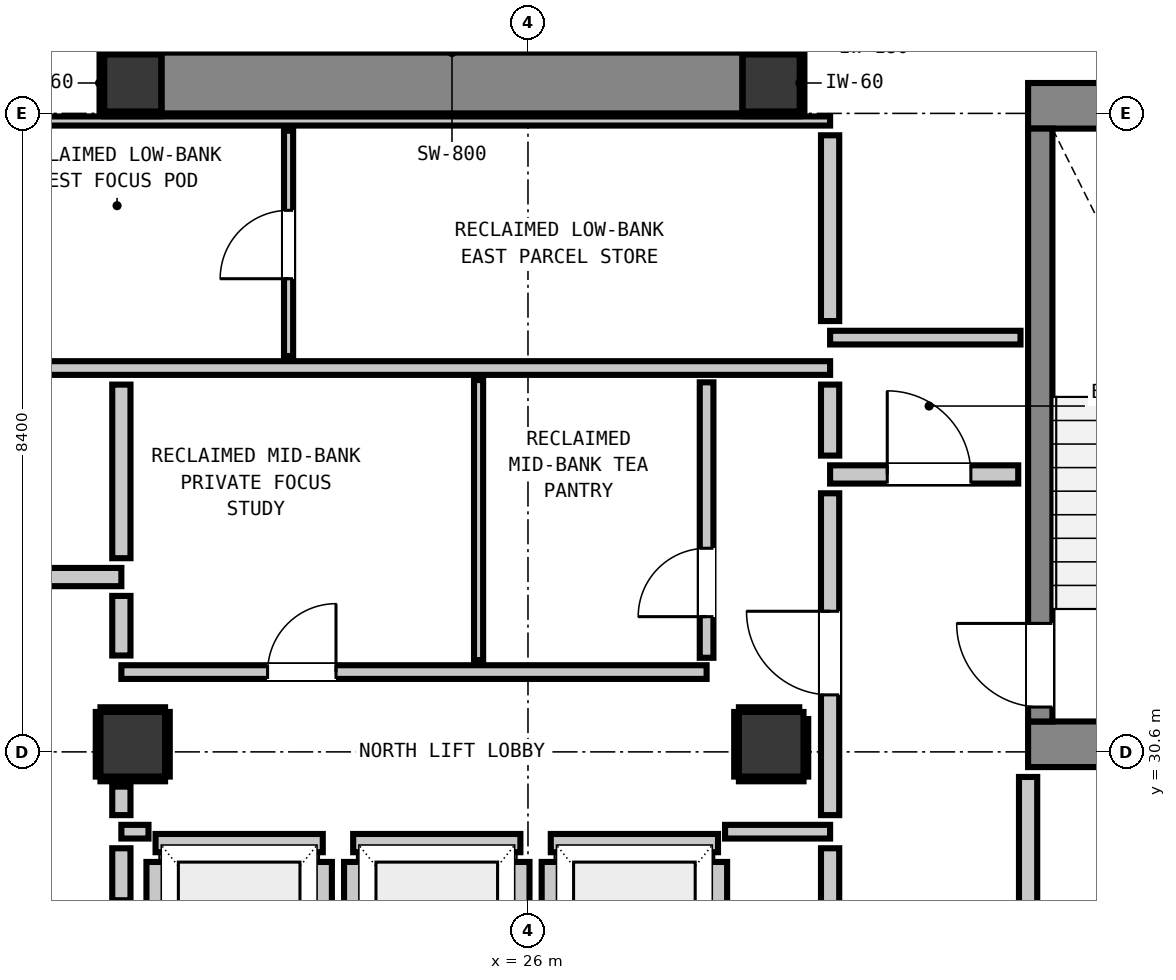
"""IFC4 building model, lengths in metres.
Left out: names, types, materials, properties, quantities, classifications, styles, units other than length and angle.
Written with IfcOpenShell. Run it as: python <this file> out.ifc"""

import sys

from ifc_helpers import new_model, si_unit, direction, frame, frame_2d, origin, origin_2d, place, context, subcontext, project, spatial, rectangle, extrude, element, fill, save


model = new_model("IFC4")
c1 = context("Model", 3, precision=1e-05, world=origin(), true_north=direction((0.0, 1.0)))
c2 = subcontext(c1, "Body", "Model", "MODEL_VIEW")
j1 = project(units=[si_unit("LENGTHUNIT", "METRE"), si_unit("PLANEANGLEUNIT", "RADIAN")], contexts=[c1])
p1 = place(None, origin())
s1 = spatial("IfcSite", under=j1, at=p1, CompositionType="ELEMENT")
p2 = place(p1, origin())
s2 = spatial("IfcBuilding", under=s1, at=p2, CompositionType="ELEMENT")
p3 = place(p2, frame((0.0, 0.0, 241.24)))
s3 = spatial("IfcBuildingStorey", under=s2, at=p3, CompositionType="ELEMENT", Elevation=241.24)
for number, where, z_axis, x_axis in (
    (1, (20.8, 39.4, 0.0), (0.0, 0.0, 1.0), (1.0, 0.0, 0.0)),
    (2, (29.2, 39.4, 0.0), (0.0, 0.0, 1.0), (1.0, 0.0, 0.0)),
):
    element("IfcColumn", number, at=place(p3, frame(where, z_axis=z_axis, x_axis=x_axis)), inside=s3, PredefinedType="COLUMN", context=c2, shape_type="SweptSolid", body=[
        extrude(rectangle(XDim=0.75, YDim=0.75, at=origin_2d()), origin(), (0.0, 0.0, 1.0), 3.32),
    ])
p4 = place(p3, frame((32.58, 39.1, 0.0), z_axis=(0.0, 0.0, 1.0), x_axis=(1.0, 0.0, 0.0)))
e3 = element("IfcWall", 3, at=p4, inside=s3, PredefinedType="SHEAR", context=c2, shape_type="SweptSolid", body=[
    extrude(rectangle(XDim=4.08, YDim=0.6, at=frame_2d((2.04, 0.0))), origin(), (0.0, 0.0, 1.0), 3.32),
])
p5 = place(p3, frame((32.58, 30.7, 0.0), z_axis=(0.0, 0.0, 1.0), x_axis=(1.0, 0.0, 0.0)))
e4 = element("IfcWall", 4, at=p5, inside=s3, PredefinedType="SHEAR", context=c2, shape_type="SweptSolid", body=[
    extrude(rectangle(XDim=3.54, YDim=0.6, at=frame_2d((1.77, 0.0))), origin(), (0.0, 0.0, 1.0), 3.32),
])
p6 = place(p3, frame((21.18, 39.4, 0.0), z_axis=(0.0, 0.0, 1.0), x_axis=(1.0, 0.0, 0.0)))
e5 = element("IfcWall", 5, at=p6, inside=s3, PredefinedType="SHEAR", context=c2, shape_type="SweptSolid", body=[
    extrude(rectangle(XDim=7.64, YDim=0.8, at=frame_2d((3.82, 0.0))), origin(), (0.0, 0.0, 1.0), 3.32),
])
p7 = place(p3, frame((32.74, 31.0, 0.0), z_axis=(0.0, 0.0, 1.0), x_axis=(0.0, 1.0, 0.0)))
e6 = element("IfcWall", 6, at=p7, inside=s3, PredefinedType="SHEAR", context=c2, shape_type="SweptSolid", body=[
    extrude(rectangle(XDim=7.8, YDim=0.32, at=frame_2d((3.9, 0.0))), origin(), (0.0, 0.0, 1.0), 3.32),
])
p8 = place(p7, frame((0.19, 0.0, 0.0)))
e7 = element("IfcOpeningElement", 7, at=p8, cuts=e6, PredefinedType="OPENING", context=c2, shape_type="SweptSolid", body=[
    extrude(rectangle(XDim=1.1, YDim=2.15, at=frame_2d((0.55, 1.075))), frame((0.0, 0.17, 0.0), z_axis=(0.0, -1.0, 0.0), x_axis=(1.0, 0.0, 0.0)), (0.0, 0.0, 1.0), 0.34),
])
for number, where, z_axis, x_axis in (
    (8, (20.8, 30.7, 0.0), (0.0, 0.0, 1.0), (1.0, 0.0, 0.0)),
    (9, (29.2, 30.7, 0.0), (0.0, 0.0, 1.0), (1.0, 0.0, 0.0)),
):
    element("IfcColumn", number, at=place(p3, frame(where, z_axis=z_axis, x_axis=x_axis)), inside=s3, PredefinedType="COLUMN", context=c2, shape_type="SweptSolid", body=[
        extrude(rectangle(XDim=0.85, YDim=0.85, at=origin_2d()), origin(), (0.0, 0.0, 1.0), 3.32),
    ])
p9 = place(p3, frame((21.1, 29.4, 0.0), z_axis=(0.0, 0.0, 1.0), x_axis=(1.0, 0.0, 0.0)))
e10 = element("IfcWall", 10, at=p9, inside=s3, PredefinedType="PARTITIONING", context=c2, shape_type="SweptSolid", body=[
    extrude(rectangle(XDim=2.2, YDim=0.24, at=frame_2d((1.1, 0.0))), origin(), (0.0, 0.0, 1.0), 3.1),
])
p10 = place(p3, frame((21.1, 27.048, 0.0), z_axis=(0.0, 0.0, 1.0), x_axis=(0.0, 1.0, 0.0)))
e11 = element("IfcWall", 11, at=p10, inside=s3, PredefinedType="PARTITIONING", context=c2, shape_type="SweptSolid", body=[
    extrude(rectangle(XDim=2.104, YDim=0.24, at=frame_2d((1.052, 0.0))), origin(), (0.0, 0.0, 1.0), 2.335),
])
p11 = place(p3, frame((23.3, 27.048, 0.0), z_axis=(0.0, 0.0, 1.0), x_axis=(0.0, 1.0, 0.0)))
e12 = element("IfcWall", 12, at=p11, inside=s3, PredefinedType="PARTITIONING", context=c2, shape_type="SweptSolid", body=[
    extrude(rectangle(XDim=2.104, YDim=0.24, at=frame_2d((1.052, 0.0))), origin(), (0.0, 0.0, 1.0), 3.1),
])
p12 = place(p3, frame((23.7, 29.4, 0.0), z_axis=(0.0, 0.0, 1.0), x_axis=(1.0, 0.0, 0.0)))
e13 = element("IfcWall", 13, at=p12, inside=s3, PredefinedType="PARTITIONING", context=c2, shape_type="SweptSolid", body=[
    extrude(rectangle(XDim=2.2, YDim=0.24, at=frame_2d((1.1, 0.0))), origin(), (0.0, 0.0, 1.0), 3.1),
])
for number, where, z_axis, x_axis in (
    (14, (23.7, 27.048, 0.0), (0.0, 0.0, 1.0), (0.0, 1.0, 0.0)),
    (15, (25.9, 27.048, 0.0), (0.0, 0.0, 1.0), (0.0, 1.0, 0.0)),
):
    element("IfcWall", number, at=place(p3, frame(where, z_axis=z_axis, x_axis=x_axis)), inside=s3, PredefinedType="PARTITIONING", context=c2, shape_type="SweptSolid", body=[
        extrude(rectangle(XDim=2.104, YDim=0.24, at=frame_2d((1.052, 0.0))), origin(), (0.0, 0.0, 1.0), 3.1),
    ])
p13 = place(p3, frame((26.3, 29.4, 0.0), z_axis=(0.0, 0.0, 1.0), x_axis=(1.0, 0.0, 0.0)))
e16 = element("IfcWall", 16, at=p13, inside=s3, PredefinedType="PARTITIONING", context=c2, shape_type="SweptSolid", body=[
    extrude(rectangle(XDim=2.2, YDim=0.24, at=frame_2d((1.1, 0.0))), origin(), (0.0, 0.0, 1.0), 3.1),
])
p14 = place(p3, frame((26.3, 27.048, 0.0), z_axis=(0.0, 0.0, 1.0), x_axis=(0.0, 1.0, 0.0)))
e17 = element("IfcWall", 17, at=p14, inside=s3, PredefinedType="PARTITIONING", context=c2, shape_type="SweptSolid", body=[
    extrude(rectangle(XDim=2.104, YDim=0.24, at=frame_2d((1.052, 0.0))), origin(), (0.0, 0.0, 1.0), 3.1),
])
p15 = place(p3, frame((28.5, 27.33, 0.0), z_axis=(0.0, 0.0, 1.0), x_axis=(0.0, 1.0, 0.0)))
e18 = element("IfcWall", 18, at=p15, inside=s3, PredefinedType="PARTITIONING", context=c2, shape_type="SweptSolid", body=[
    extrude(rectangle(XDim=1.822, YDim=0.24, at=frame_2d((0.911, 0.0))), origin(), (0.0, 0.0, 1.0), 3.1),
])
p16 = place(p3, frame((17.45, 32.9, 0.0), z_axis=(0.0, 0.0, 1.0), x_axis=(1.0, 0.0, 0.0)))
e19 = element("IfcWall", 19, at=p16, inside=s3, PredefinedType="PARTITIONING", context=c2, shape_type="SweptSolid", body=[
    extrude(rectangle(XDim=3.2, YDim=0.24, at=frame_2d((1.6, 0.0))), origin(), (0.0, 0.0, 1.0), 3.1),
])
p17 = place(p16, frame((0.159, 0.0, 0.0)))
e20 = element("IfcOpeningElement", 20, at=p17, cuts=e19, PredefinedType="OPENING", context=c2, shape_type="SweptSolid", body=[
    extrude(rectangle(XDim=1.1, YDim=2.15, at=frame_2d((0.55, 1.075))), frame((0.0, 0.13, 0.0), z_axis=(0.0, -1.0, 0.0), x_axis=(1.0, 0.0, 0.0)), (0.0, 0.0, 1.0), 0.26),
])
p18 = place(p3, frame((29.975, 34.25, 0.0), z_axis=(0.0, 0.0, 1.0), x_axis=(1.0, 0.0, 0.0)))
e21 = element("IfcWall", 21, at=p18, inside=s3, PredefinedType="PARTITIONING", context=c2, shape_type="SweptSolid", body=[
    extrude(rectangle(XDim=2.475, YDim=0.24, at=frame_2d((1.237, 0.0))), origin(), (0.0, 0.0, 1.0), 3.1),
])
p19 = place(p18, frame((0.752, 0.0, 0.0)))
e22 = element("IfcOpeningElement", 22, at=p19, cuts=e21, PredefinedType="OPENING", context=c2, shape_type="SweptSolid", body=[
    extrude(rectangle(XDim=1.1, YDim=2.15, at=frame_2d((0.55, 1.075))), frame((0.0, 0.13, 0.0), z_axis=(0.0, -1.0, 0.0), x_axis=(1.0, 0.0, 0.0)), (0.0, 0.0, 1.0), 0.26),
])
p20 = place(p3, frame((20.65, 29.55, 0.0), z_axis=(0.0, 0.0, 1.0), x_axis=(1.0, 0.0, 0.0)))
e23 = element("IfcWall", 23, at=p20, inside=s3, PredefinedType="PARTITIONING", context=c2, shape_type="SweptSolid", body=[
    extrude(rectangle(XDim=0.357, YDim=0.18, at=frame_2d((0.179, 0.0))), origin(), (0.0, 0.0, 1.0), 3.1),
])
p21 = place(p3, frame((28.593, 29.55, 0.0), z_axis=(0.0, 0.0, 1.0), x_axis=(1.0, 0.0, 0.0)))
e24 = element("IfcWall", 24, at=p21, inside=s3, PredefinedType="PARTITIONING", context=c2, shape_type="SweptSolid", body=[
    extrude(rectangle(XDim=1.382, YDim=0.18, at=frame_2d((0.691, 0.0))), origin(), (0.0, 0.0, 1.0), 3.1),
])
p22 = place(p3, frame((20.65, 31.65, 0.0), z_axis=(0.0, 0.0, 1.0), x_axis=(1.0, 0.0, 0.0)))
e25 = element("IfcWall", 25, at=p22, inside=s3, PredefinedType="PARTITIONING", context=c2, shape_type="SweptSolid", body=[
    extrude(rectangle(XDim=7.7, YDim=0.18, at=frame_2d((3.85, 0.0))), origin(), (0.0, 0.0, 1.0), 3.1),
])
p23 = place(p22, frame((1.924, 0.0, 0.0)))
e26 = element("IfcOpeningElement", 26, at=p23, cuts=e25, PredefinedType="OPENING", context=c2, shape_type="SweptSolid", body=[
    extrude(rectangle(XDim=0.9, YDim=2.1, at=frame_2d((0.45, 1.05))), frame((0.0, 0.1, 0.0), z_axis=(0.0, -1.0, 0.0), x_axis=(1.0, 0.0, 0.0)), (0.0, 0.0, 1.0), 0.2),
])
p24 = place(p3, frame((18.95, 35.65, 0.0), z_axis=(0.0, 0.0, 1.0), x_axis=(1.0, 0.0, 0.0)))
e27 = element("IfcWall", 27, at=p24, inside=s3, PredefinedType="PARTITIONING", context=c2, shape_type="SweptSolid", body=[
    extrude(rectangle(XDim=11.025, YDim=0.18, at=frame_2d((5.513, 0.0))), origin(), (0.0, 0.0, 1.0), 3.1),
])
p25 = place(p3, frame((29.975, 36.05, 0.0), z_axis=(0.0, 0.0, 1.0), x_axis=(1.0, 0.0, 0.0)))
e28 = element("IfcWall", 28, at=p25, inside=s3, PredefinedType="PARTITIONING", context=c2, shape_type="SweptSolid", body=[
    extrude(rectangle(XDim=2.505, YDim=0.18, at=frame_2d((1.252, 0.0))), origin(), (0.0, 0.0, 1.0), 3.1),
])
p26 = place(p3, frame((18.95, 38.9, 0.0), z_axis=(0.0, 0.0, 1.0), x_axis=(1.0, 0.0, 0.0)))
e29 = element("IfcWall", 29, at=p26, inside=s3, PredefinedType="PARTITIONING", context=c2, shape_type="SweptSolid", body=[
    extrude(rectangle(XDim=11.025, YDim=0.12, at=frame_2d((5.513, 0.0))), origin(), (0.0, 0.0, 1.0), 3.1),
])
p27 = place(p3, frame((20.65, 28.648, 0.0), z_axis=(0.0, 0.0, 1.0), x_axis=(0.0, 1.0, 0.0)))
e30 = element("IfcWall", 30, at=p27, inside=s3, PredefinedType="PARTITIONING", context=c2, shape_type="SweptSolid", body=[
    extrude(rectangle(XDim=0.684, YDim=0.24, at=frame_2d((0.342, 0.0))), origin(), (0.0, 0.0, 1.0), 2.335),
])
p28 = place(p3, frame((20.65, 29.768, 0.0), z_axis=(0.0, 0.0, 1.0), x_axis=(0.0, 1.0, 0.0)))
e31 = element("IfcWall", 31, at=p28, inside=s3, PredefinedType="PARTITIONING", context=c2, shape_type="SweptSolid", body=[
    extrude(rectangle(XDim=0.375, YDim=0.24, at=frame_2d((0.188, 0.0))), origin(), (0.0, 0.0, 1.0), 2.335),
])
p29 = place(p3, frame((20.65, 31.868, 0.0), z_axis=(0.0, 0.0, 1.0), x_axis=(0.0, 1.0, 0.0)))
e32 = element("IfcWall", 32, at=p29, inside=s3, PredefinedType="PARTITIONING", context=c2, shape_type="SweptSolid", body=[
    extrude(rectangle(XDim=0.784, YDim=0.24, at=frame_2d((0.392, 0.0))), origin(), (0.0, 0.0, 1.0), 2.335),
])
p30 = place(p3, frame((20.65, 33.148, 0.0), z_axis=(0.0, 0.0, 1.0), x_axis=(0.0, 1.0, 0.0)))
e33 = element("IfcWall", 33, at=p30, inside=s3, PredefinedType="PARTITIONING", context=c2, shape_type="SweptSolid", body=[
    extrude(rectangle(XDim=2.284, YDim=0.24, at=frame_2d((1.142, 0.0))), origin(), (0.0, 0.0, 1.0), 2.335),
])
p31 = place(p3, frame((29.975, 25.648, 0.0), z_axis=(0.0, 0.0, 1.0), x_axis=(0.0, 1.0, 0.0)))
e34 = element("IfcWall", 34, at=p31, inside=s3, PredefinedType="PARTITIONING", context=c2, shape_type="SweptSolid", body=[
    extrude(rectangle(XDim=3.684, YDim=0.24, at=frame_2d((1.842, 0.0))), origin(), (0.0, 0.0, 1.0), 3.1),
])
p32 = place(p3, frame((29.975, 29.768, 0.0), z_axis=(0.0, 0.0, 1.0), x_axis=(0.0, 1.0, 0.0)))
e35 = element("IfcWall", 35, at=p32, inside=s3, PredefinedType="PARTITIONING", context=c2, shape_type="SweptSolid", body=[
    extrude(rectangle(XDim=4.234, YDim=0.24, at=frame_2d((2.117, 0.0))), origin(), (0.0, 0.0, 1.0), 3.1),
])
p33 = place(p32, frame((1.582, 0.0, 0.0)))
e36 = element("IfcOpeningElement", 36, at=p33, cuts=e35, PredefinedType="OPENING", context=c2, shape_type="SweptSolid", body=[
    extrude(rectangle(XDim=1.1, YDim=2.15, at=frame_2d((0.55, 1.075))), frame((0.0, 0.13, 0.0), z_axis=(0.0, -1.0, 0.0), x_axis=(1.0, 0.0, 0.0)), (0.0, 0.0, 1.0), 0.26),
])
p34 = place(p3, frame((29.975, 34.498, 0.0), z_axis=(0.0, 0.0, 1.0), x_axis=(0.0, 1.0, 0.0)))
e37 = element("IfcWall", 37, at=p34, inside=s3, PredefinedType="PARTITIONING", context=c2, shape_type="SweptSolid", body=[
    extrude(rectangle(XDim=0.934, YDim=0.24, at=frame_2d((0.467, 0.0))), origin(), (0.0, 0.0, 1.0), 3.1),
])
p35 = place(p3, frame((29.975, 36.268, 0.0), z_axis=(0.0, 0.0, 1.0), x_axis=(0.0, 1.0, 0.0)))
e38 = element("IfcWall", 38, at=p35, inside=s3, PredefinedType="PARTITIONING", context=c2, shape_type="SweptSolid", body=[
    extrude(rectangle(XDim=2.444, YDim=0.24, at=frame_2d((1.222, 0.0))), origin(), (0.0, 0.0, 1.0), 3.1),
])
p36 = place(p3, frame((32.58, 25.648, 0.0), z_axis=(0.0, 0.0, 1.0), x_axis=(0.0, 1.0, 0.0)))
e39 = element("IfcWall", 39, at=p36, inside=s3, PredefinedType="PARTITIONING", context=c2, shape_type="SweptSolid", body=[
    extrude(rectangle(XDim=4.622, YDim=0.24, at=frame_2d((2.311, 0.0))), origin(), (0.0, 0.0, 1.0), 3.1),
])
p37 = place(p3, frame((28.35, 31.838, 0.0), z_axis=(0.0, 0.0, 1.0), x_axis=(0.0, 1.0, 0.0)))
e40 = element("IfcWall", 40, at=p37, inside=s3, PredefinedType="PARTITIONING", context=c2, shape_type="SweptSolid", body=[
    extrude(rectangle(XDim=3.624, YDim=0.18, at=frame_2d((1.812, 0.0))), origin(), (0.0, 0.0, 1.0), 3.1),
])
p38 = place(p37, frame((0.541, 0.0, 0.0)))
e41 = element("IfcOpeningElement", 41, at=p38, cuts=e40, PredefinedType="OPENING", context=c2, shape_type="SweptSolid", body=[
    extrude(rectangle(XDim=0.9, YDim=2.1, at=frame_2d((0.45, 1.05))), frame((0.0, 0.1, 0.0), z_axis=(0.0, -1.0, 0.0), x_axis=(1.0, 0.0, 0.0)), (0.0, 0.0, 1.0), 0.2),
])
p39 = place(p3, frame((22.85, 35.808, 0.0), z_axis=(0.0, 0.0, 1.0), x_axis=(0.0, 1.0, 0.0)))
e42 = element("IfcWall", 42, at=p39, inside=s3, PredefinedType="PARTITIONING", context=c2, shape_type="SweptSolid", body=[
    extrude(rectangle(XDim=2.964, YDim=0.12, at=frame_2d((1.482, 0.0))), origin(), (0.0, 0.0, 1.0), 3.1),
])
p40 = place(p39, frame((1.017, 0.0, 0.0)))
e43 = element("IfcOpeningElement", 43, at=p40, cuts=e42, PredefinedType="OPENING", context=c2, shape_type="SweptSolid", body=[
    extrude(rectangle(XDim=0.9, YDim=2.1, at=frame_2d((0.45, 1.05))), frame((0.0, 0.07, 0.0), z_axis=(0.0, -1.0, 0.0), x_axis=(1.0, 0.0, 0.0)), (0.0, 0.0, 1.0), 0.14),
])
p41 = place(p3, frame((25.35, 31.808, 0.0), z_axis=(0.0, 0.0, 1.0), x_axis=(0.0, 1.0, 0.0)))
e44 = element("IfcWall", 44, at=p41, inside=s3, PredefinedType="PARTITIONING", context=c2, shape_type="SweptSolid", body=[
    extrude(rectangle(XDim=3.684, YDim=0.12, at=frame_2d((1.842, 0.0))), origin(), (0.0, 0.0, 1.0), 3.1),
])
for number, where, z_axis, x_axis in (
    (45, (20.425, 38.993, 0.0), (0.0, 0.0, 1.0), (1.0, 0.0, 0.0)),
    (46, (20.425, 39.807, 0.0), (0.0, 0.0, 1.0), (1.0, 0.0, 0.0)),
):
    element("IfcWall", number, at=place(p3, frame(where, z_axis=z_axis, x_axis=x_axis)), inside=s3, PredefinedType="PARTITIONING", context=c2, shape_type="SweptSolid", body=[
        extrude(rectangle(XDim=0.742, YDim=0.06, at=frame_2d((0.371, 0.0))), origin(), (0.0, 0.0, 1.0), 1.45),
    ])
p42 = place(p3, frame((20.393, 39.025, 0.0), z_axis=(0.0, 0.0, 1.0), x_axis=(0.0, 1.0, 0.0)))
e47 = element("IfcWall", 47, at=p42, inside=s3, PredefinedType="PARTITIONING", context=c2, shape_type="SweptSolid", body=[
    extrude(rectangle(XDim=0.75, YDim=0.06, at=frame_2d((0.375, 0.0))), origin(), (0.0, 0.0, 1.0), 1.45),
])
for number, where, z_axis, x_axis in (
    (48, (28.833, 38.993, 0.0), (0.0, 0.0, 1.0), (1.0, 0.0, 0.0)),
    (49, (28.833, 39.807, 0.0), (0.0, 0.0, 1.0), (1.0, 0.0, 0.0)),
):
    element("IfcWall", number, at=place(p3, frame(where, z_axis=z_axis, x_axis=x_axis)), inside=s3, PredefinedType="PARTITIONING", context=c2, shape_type="SweptSolid", body=[
        extrude(rectangle(XDim=0.742, YDim=0.06, at=frame_2d((0.371, 0.0))), origin(), (0.0, 0.0, 1.0), 1.45),
    ])
p43 = place(p3, frame((29.607, 39.025, 0.0), z_axis=(0.0, 0.0, 1.0), x_axis=(0.0, 1.0, 0.0)))
e50 = element("IfcWall", 50, at=p43, inside=s3, PredefinedType="PARTITIONING", context=c2, shape_type="SweptSolid", body=[
    extrude(rectangle(XDim=0.75, YDim=0.06, at=frame_2d((0.375, 0.0))), origin(), (0.0, 0.0, 1.0), 1.45),
])
for number, where, z_axis, x_axis in (
    (51, (20.375, 30.243, 0.0), (0.0, 0.0, 1.0), (1.0, 0.0, 0.0)),
    (52, (20.375, 31.157, 0.0), (0.0, 0.0, 1.0), (1.0, 0.0, 0.0)),
    (53, (20.343, 30.275, 0.0), (0.0, 0.0, 1.0), (0.0, 1.0, 0.0)),
    (54, (21.257, 30.275, 0.0), (0.0, 0.0, 1.0), (0.0, 1.0, 0.0)),
    (55, (28.775, 30.243, 0.0), (0.0, 0.0, 1.0), (1.0, 0.0, 0.0)),
):
    element("IfcWall", number, at=place(p3, frame(where, z_axis=z_axis, x_axis=x_axis)), inside=s3, PredefinedType="PARTITIONING", context=c2, shape_type="SweptSolid", body=[
        extrude(rectangle(XDim=0.85, YDim=0.06, at=frame_2d((0.425, 0.0))), origin(), (0.0, 0.0, 1.0), 1.45),
    ])
p44 = place(p3, frame((28.775, 31.157, 0.0), z_axis=(0.0, 0.0, 1.0), x_axis=(1.0, 0.0, 0.0)))
e56 = element("IfcWall", 56, at=p44, inside=s3, PredefinedType="PARTITIONING", context=c2, shape_type="SweptSolid", body=[
    extrude(rectangle(XDim=0.794, YDim=0.06, at=frame_2d((0.397, 0.0))), origin(), (0.0, 0.0, 1.0), 1.45),
])
p45 = place(p3, frame((28.743, 30.275, 0.0), z_axis=(0.0, 0.0, 1.0), x_axis=(0.0, 1.0, 0.0)))
e57 = element("IfcWall", 57, at=p45, inside=s3, PredefinedType="PARTITIONING", context=c2, shape_type="SweptSolid", body=[
    extrude(rectangle(XDim=0.85, YDim=0.06, at=frame_2d((0.425, 0.0))), origin(), (0.0, 0.0, 1.0), 1.45),
])
p46 = place(p3, frame((29.657, 30.275, 0.0), z_axis=(0.0, 0.0, 1.0), x_axis=(0.0, 1.0, 0.0)))
e58 = element("IfcWall", 58, at=p46, inside=s3, PredefinedType="PARTITIONING", context=c2, shape_type="SweptSolid", body=[
    extrude(rectangle(XDim=0.757, YDim=0.06, at=frame_2d((0.378, 0.0))), origin(), (0.0, 0.0, 1.0), 1.45),
])
p47 = place(p8, origin())
e59 = element("IfcDoor", 59, at=p47, inside=s3, OperationType="SINGLE_SWING_RIGHT", PredefinedType="DOOR", context=c2, shape_type="SweptSolid", body=[
    extrude(rectangle(XDim=1.1, YDim=2.15, at=frame_2d((0.55, 1.075))), frame((0.0, 0.025, 0.0), z_axis=(0.0, -1.0, 0.0), x_axis=(1.0, 0.0, 0.0)), (0.0, 0.0, 1.0), 0.05),
])
fill(e7, e59)
p48 = place(p33, origin())
e60 = element("IfcDoor", 60, at=p48, inside=s3, OperationType="SINGLE_SWING_RIGHT", PredefinedType="DOOR", context=c2, shape_type="SweptSolid", body=[
    extrude(rectangle(XDim=1.1, YDim=2.15, at=frame_2d((0.55, 1.075))), frame((0.0, 0.025, 0.0), z_axis=(0.0, -1.0, 0.0), x_axis=(1.0, 0.0, 0.0)), (0.0, 0.0, 1.0), 0.05),
])
fill(e36, e60)
p49 = place(p19, origin())
e61 = element("IfcDoor", 61, at=p49, inside=s3, OperationType="SINGLE_SWING_LEFT", PredefinedType="DOOR", context=c2, shape_type="SweptSolid", body=[
    extrude(rectangle(XDim=1.1, YDim=2.15, at=frame_2d((0.55, 1.075))), frame((0.0, 0.025, 0.0), z_axis=(0.0, -1.0, 0.0), x_axis=(1.0, 0.0, 0.0)), (0.0, 0.0, 1.0), 0.05),
])
fill(e22, e61)
p50 = place(p40, origin())
e62 = element("IfcDoor", 62, at=p50, inside=s3, OperationType="SINGLE_SWING_LEFT", PredefinedType="DOOR", context=c2, shape_type="SweptSolid", body=[
    extrude(rectangle(XDim=0.9, YDim=2.1, at=frame_2d((0.45, 1.05))), frame((0.0, 0.025, 0.0), z_axis=(0.0, -1.0, 0.0), x_axis=(1.0, 0.0, 0.0)), (0.0, 0.0, 1.0), 0.05),
])
fill(e43, e62)
p51 = place(p23, origin())
e63 = element("IfcDoor", 63, at=p51, inside=s3, OperationType="SINGLE_SWING_RIGHT", PredefinedType="DOOR", context=c2, shape_type="SweptSolid", body=[
    extrude(rectangle(XDim=0.9, YDim=2.1, at=frame_2d((0.45, 1.05))), frame((0.0, 0.025, 0.0), z_axis=(0.0, -1.0, 0.0), x_axis=(1.0, 0.0, 0.0)), (0.0, 0.0, 1.0), 0.05),
])
fill(e26, e63)
p52 = place(p38, origin())
e64 = element("IfcDoor", 64, at=p52, inside=s3, OperationType="SINGLE_SWING_LEFT", PredefinedType="DOOR", context=c2, shape_type="SweptSolid", body=[
    extrude(rectangle(XDim=0.9, YDim=2.1, at=frame_2d((0.45, 1.05))), frame((0.0, 0.025, 0.0), z_axis=(0.0, -1.0, 0.0), x_axis=(1.0, 0.0, 0.0)), (0.0, 0.0, 1.0), 0.05),
])
fill(e41, e64)
save(model, sys.argv[1])
